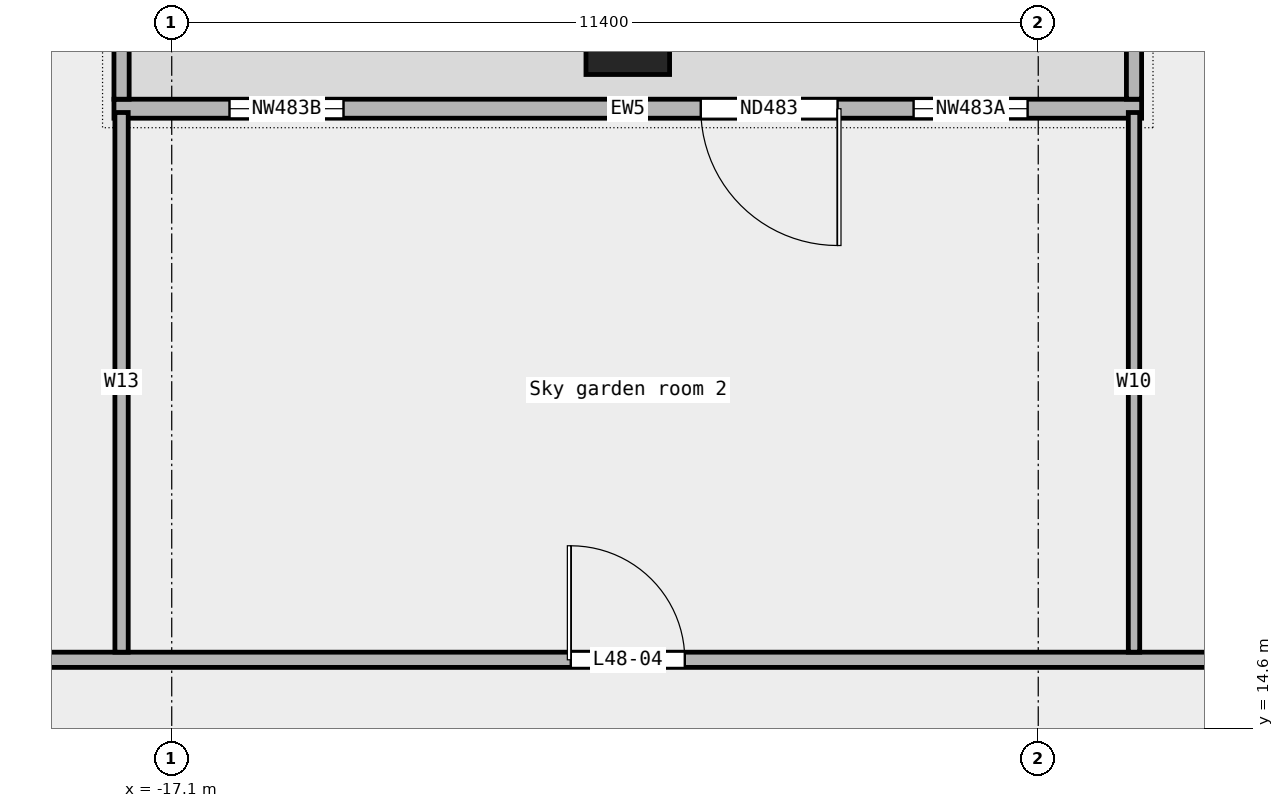
"""IFC4 building model, lengths in metres.
Left out: names, types, materials, properties, quantities, classifications, styles, units other than length and angle.
Written with IfcOpenShell. Run it as: python <this file> out.ifc"""

import sys

from ifc_helpers import new_model, si_unit, direction, frame, frame_2d, origin, origin_2d, place, context, subcontext, project, spatial, rectangle, extrude, element, fill, save


model = new_model("IFC4")
c1 = context("Model", 3, precision=1e-05, world=origin(), true_north=direction((0.0, 1.0)))
c2 = subcontext(c1, "Body", "Model", "MODEL_VIEW")
j1 = project(units=[si_unit("LENGTHUNIT", "METRE"), si_unit("PLANEANGLEUNIT", "RADIAN")], contexts=[c1])
p1 = place(None, origin())
s1 = spatial("IfcSite", under=j1, at=p1, CompositionType="ELEMENT")
p2 = place(p1, origin())
s2 = spatial("IfcBuilding", under=s1, at=p2, CompositionType="ELEMENT")
p3 = place(p2, frame((0.0, 0.0, 227.0)))
s3 = spatial("IfcBuildingStorey", under=s2, at=p3, CompositionType="ELEMENT", Elevation=227.0)
p4 = place(p3, frame((-11.1, 23.75, 0.0), z_axis=(0.0, 0.0, 1.0), x_axis=(1.0, 0.0, 0.0)))
e1 = element("IfcColumn", 1, at=p4, inside=s3, PredefinedType="COLUMN", context=c2, shape_type="SweptSolid", body=[
    extrude(rectangle(XDim=1.1, YDim=1.1, at=origin_2d()), origin(), (0.0, 0.0, 1.0), 3.6),
])
p5 = place(p3, frame((-4.34, 22.75, 0.0), z_axis=(0.0, 0.0, 1.0), x_axis=(-1.0, 0.0, 0.0)))
e2 = element("IfcWall", 2, at=p5, inside=s3, PredefinedType="STANDARD", context=c2, shape_type="SweptSolid", body=[
    extrude(rectangle(XDim=13.52, YDim=0.25, at=frame_2d((6.76, 0.0))), origin(), (0.0, 0.0, 1.0), 3.6),
])
p6 = place(p5, frame((1.5, 0.0, 0.45)))
e3 = element("IfcOpeningElement", 3, at=p6, cuts=e2, PredefinedType="OPENING", context=c2, shape_type="SweptSolid", body=[
    extrude(rectangle(XDim=1.5, YDim=2.4, at=frame_2d((0.75, 1.2))), frame((0.0, 0.137, 0.0), z_axis=(0.0, -1.0, 0.0), x_axis=(1.0, 0.0, 0.0)), (0.0, 0.0, 1.0), 0.274),
])
p7 = place(p5, frame((4.0, 0.0, 0.0)))
e4 = element("IfcOpeningElement", 4, at=p7, cuts=e2, PredefinedType="OPENING", context=c2, shape_type="SweptSolid", body=[
    extrude(rectangle(XDim=1.8, YDim=2.4, at=frame_2d((0.9, 1.2))), frame((0.0, 0.137, 0.0), z_axis=(0.0, -1.0, 0.0), x_axis=(1.0, 0.0, 0.0)), (0.0, 0.0, 1.0), 0.274),
])
p8 = place(p5, frame((10.5, 0.0, 0.45)))
e5 = element("IfcOpeningElement", 5, at=p8, cuts=e2, PredefinedType="OPENING", context=c2, shape_type="SweptSolid", body=[
    extrude(rectangle(XDim=1.5, YDim=2.4, at=frame_2d((0.75, 1.2))), frame((0.0, 0.137, 0.0), z_axis=(0.0, -1.0, 0.0), x_axis=(1.0, 0.0, 0.0)), (0.0, 0.0, 1.0), 0.274),
])
for number, where, z_axis, x_axis in (
    (6, (-4.44, 24.75, 0.0), (0.0, 0.0, 1.0), (0.0, -1.0, 0.0)),
    (7, (-17.76, 24.75, 0.0), (0.0, 0.0, 1.0), (0.0, -1.0, 0.0)),
):
    element("IfcWall", number, at=place(p3, frame(where, z_axis=z_axis, x_axis=x_axis)), inside=s3, PredefinedType="STANDARD", context=c2, shape_type="SweptSolid", body=[
        extrude(rectangle(XDim=1.875, YDim=0.2, at=frame_2d((0.938, 0.0))), origin(), (0.0, 0.0, 1.0), 3.6),
    ])
p9 = place(p3, frame((-28.15, 15.5, 0.0), z_axis=(0.0, 0.0, 1.0), x_axis=(1.0, 0.0, 0.0)))
e8 = element("IfcWall", 8, at=p9, inside=s3, PredefinedType="PARTITIONING", context=c2, shape_type="SweptSolid", body=[
    extrude(rectangle(XDim=56.3, YDim=0.2, at=frame_2d((28.15, 0.0))), origin(), (0.0, 0.0, 1.0), 3.6),
])
p10 = place(p9, frame((16.3, 0.0, 0.0)))
e9 = element("IfcOpeningElement", 9, at=p10, cuts=e8, PredefinedType="OPENING", context=c2, shape_type="SweptSolid", body=[
    extrude(rectangle(XDim=1.5, YDim=2.1, at=frame_2d((0.75, 1.05))), frame((0.0, 0.112, 0.0), z_axis=(0.0, -1.0, 0.0), x_axis=(1.0, 0.0, 0.0)), (0.0, 0.0, 1.0), 0.224),
])
p11 = place(p9, frame((46.225, 0.0, 0.0)))
e10 = element("IfcOpeningElement", 10, at=p11, cuts=e8, PredefinedType="OPENING", context=c2, shape_type="SweptSolid", body=[
    extrude(rectangle(XDim=1.8, YDim=2.1, at=frame_2d((0.9, 1.05))), frame((0.0, 0.112, 0.0), z_axis=(0.0, -1.0, 0.0), x_axis=(1.0, 0.0, 0.0)), (0.0, 0.0, 1.0), 0.224),
])
p12 = place(p9, frame((30.18, 0.0, 0.0)))
e11 = element("IfcOpeningElement", 11, at=p12, cuts=e8, PredefinedType="OPENING", context=c2, shape_type="SweptSolid", body=[
    extrude(rectangle(XDim=1.5, YDim=2.1, at=frame_2d((0.75, 1.05))), frame((0.0, 0.112, 0.0), z_axis=(0.0, -1.0, 0.0), x_axis=(1.0, 0.0, 0.0)), (0.0, 0.0, 1.0), 0.224),
])
p13 = place(p9, frame((4.695, 0.0, 0.0)))
e12 = element("IfcOpeningElement", 12, at=p13, cuts=e8, PredefinedType="OPENING", context=c2, shape_type="SweptSolid", body=[
    extrude(rectangle(XDim=1.2, YDim=2.1, at=frame_2d((0.6, 1.05))), frame((0.0, 0.112, 0.0), z_axis=(0.0, -1.0, 0.0), x_axis=(1.0, 0.0, 0.0)), (0.0, 0.0, 1.0), 0.224),
])
p14 = place(p3, frame((-17.76, 15.6, 0.0), z_axis=(0.0, 0.0, 1.0), x_axis=(0.0, 1.0, 0.0)))
e13 = element("IfcWall", 13, at=p14, inside=s3, PredefinedType="PARTITIONING", context=c2, shape_type="SweptSolid", body=[
    extrude(rectangle(XDim=7.1, YDim=0.175, at=frame_2d((3.55, 0.0))), origin(), (0.0, 0.0, 1.0), 3.6),
])
p15 = place(p3, frame((-4.44, 15.6, 0.0), z_axis=(0.0, 0.0, 1.0), x_axis=(0.0, 1.0, 0.0)))
e14 = element("IfcWall", 14, at=p15, inside=s3, PredefinedType="PARTITIONING", context=c2, shape_type="SweptSolid", body=[
    extrude(rectangle(XDim=7.1, YDim=0.15, at=frame_2d((3.55, 0.0))), origin(), (0.0, 0.0, 1.0), 3.6),
])
p16 = place(p6, origin())
e15 = element("IfcWindow", 15, at=p16, inside=s3, PartitioningType="SINGLE_PANEL", PredefinedType="WINDOW", context=c2, shape_type="SweptSolid", body=[
    extrude(rectangle(XDim=1.5, YDim=2.4, at=frame_2d((0.75, 1.2))), frame((0.0, 0.03, 0.0), z_axis=(0.0, -1.0, 0.0), x_axis=(1.0, 0.0, 0.0)), (0.0, 0.0, 1.0), 0.06),
])
fill(e3, e15)
p17 = place(p7, origin())
e16 = element("IfcDoor", 16, at=p17, inside=s3, OperationType="DOUBLE_DOOR_SINGLE_SWING", PredefinedType="DOOR", context=c2, shape_type="SweptSolid", body=[
    extrude(rectangle(XDim=1.8, YDim=2.4, at=frame_2d((0.9, 1.2))), frame((0.0, 0.025, 0.0), z_axis=(0.0, -1.0, 0.0), x_axis=(1.0, 0.0, 0.0)), (0.0, 0.0, 1.0), 0.05),
])
fill(e4, e16)
p18 = place(p8, origin())
e17 = element("IfcWindow", 17, at=p18, inside=s3, PartitioningType="SINGLE_PANEL", PredefinedType="WINDOW", context=c2, shape_type="SweptSolid", body=[
    extrude(rectangle(XDim=1.5, YDim=2.4, at=frame_2d((0.75, 1.2))), frame((0.0, 0.03, 0.0), z_axis=(0.0, -1.0, 0.0), x_axis=(1.0, 0.0, 0.0)), (0.0, 0.0, 1.0), 0.06),
])
fill(e5, e17)
p19 = place(p10, origin())
e18 = element("IfcDoor", 18, at=p19, inside=s3, OperationType="DOUBLE_DOOR_SINGLE_SWING", PredefinedType="DOOR", context=c2, shape_type="SweptSolid", body=[
    extrude(rectangle(XDim=1.5, YDim=2.1, at=frame_2d((0.75, 1.05))), frame((0.0, 0.025, 0.0), z_axis=(0.0, -1.0, 0.0), x_axis=(1.0, 0.0, 0.0)), (0.0, 0.0, 1.0), 0.05),
])
fill(e9, e18)
save(model, sys.argv[1])
